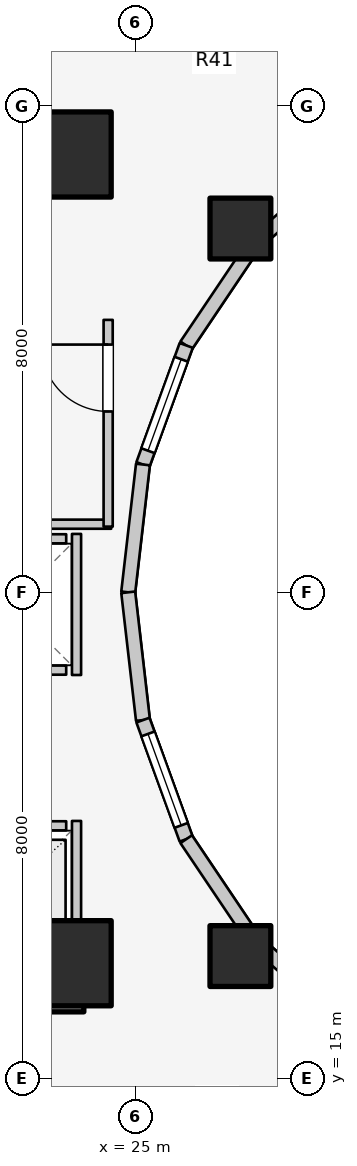
"""IFC4 building model, lengths in metres.
Left out: names, types, materials, properties, quantities, classifications, styles, units other than length and angle.
Written with IfcOpenShell. Run it as: python <this file> out.ifc"""

import sys

from ifc_helpers import new_model, si_unit, direction, frame, frame_2d, origin, origin_2d, place, context, subcontext, project, spatial, rectangle, extrude, element, fill, save


model = new_model("IFC4")
c1 = context("Model", 3, precision=1e-05, world=origin(), true_north=direction((0.0, 1.0)))
c2 = subcontext(c1, "Body", "Model", "MODEL_VIEW")
j1 = project(units=[si_unit("LENGTHUNIT", "METRE"), si_unit("PLANEANGLEUNIT", "RADIAN")], contexts=[c1])
p1 = place(None, origin())
s1 = spatial("IfcSite", under=j1, at=p1, CompositionType="ELEMENT")
p2 = place(p1, origin())
s2 = spatial("IfcBuilding", under=s1, at=p2, CompositionType="ELEMENT")
p3 = place(p2, frame((0.0, 0.0, 30.7)))
s3 = spatial("IfcBuildingStorey", under=s2, at=p3, CompositionType="ELEMENT", Elevation=30.7)
for number, where, z_axis, x_axis in (
    (1, (19.65, 16.55, 0.0), (0.0, 0.0, 1.0), (1.0, 0.0, 0.0)),
    (2, (19.65, 30.35, 0.0), (0.0, 0.0, 1.0), (1.0, 0.0, 0.0)),
):
    element("IfcWall", number, at=place(p3, frame(where, z_axis=z_axis, x_axis=x_axis)), inside=s3, PredefinedType="SHEAR", context=c2, shape_type="SweptSolid", body=[
        extrude(rectangle(XDim=4.5, YDim=0.9, at=frame_2d((2.25, 0.0))), origin(), (0.0, 0.0, 1.0), 3.1),
    ])
for number, where, z_axis, x_axis in (
    (3, (23.9, 16.9, 0.0), (0.0, 0.0, 1.0), (1.0, 0.0, 0.0)),
    (4, (23.9, 30.2, 0.0), (0.0, 0.0, 1.0), (1.0, 0.0, 0.0)),
):
    element("IfcColumn", number, at=place(p3, frame(where, z_axis=z_axis, x_axis=x_axis)), inside=s3, PredefinedType="COLUMN", context=c2, shape_type="SweptSolid", body=[
        extrude(rectangle(XDim=1.4, YDim=1.4, at=origin_2d()), origin(), (0.0, 0.0, 1.0), 3.1),
    ])
for number, where, z_axis, x_axis in (
    (5, (26.725, 28.982, 0.0), (0.0, 0.0, 1.0), (1.0, 0.0, 0.0)),
    (6, (26.725, 17.018, 0.0), (0.0, 0.0, 1.0), (1.0, 0.0, 0.0)),
):
    element("IfcColumn", number, at=place(p3, frame(where, z_axis=z_axis, x_axis=x_axis)), inside=s3, PredefinedType="COLUMN", context=c2, shape_type="SweptSolid", body=[
        extrude(rectangle(XDim=1.0, YDim=1.0, at=origin_2d()), origin(), (0.0, 0.0, 1.0), 3.1),
    ])
p4 = place(p3, frame((28.44, 30.032, 0.0), z_axis=(0.0, 0.0, 1.0), x_axis=(-0.752576694707, -0.658504607869, 0.0)))
e7 = element("IfcWall", 7, at=p4, inside=s3, PredefinedType="STANDARD", context=c2, shape_type="SweptSolid", body=[
    extrude(rectangle(XDim=1.959, YDim=0.23, at=frame_2d((0.98, 0.0))), origin(), (0.0, 0.0, 1.0), 2.16),
])
p5 = place(p3, frame((26.965, 28.742, 0.0), z_axis=(0.0, 0.0, 1.0), x_axis=(-0.558197800898, -0.829707909492, 0.0)))
e8 = element("IfcWall", 8, at=p5, inside=s3, PredefinedType="STANDARD", context=c2, shape_type="SweptSolid", body=[
    extrude(rectangle(XDim=2.027, YDim=0.23, at=frame_2d((1.013, 0.0))), origin(), (0.0, 0.0, 1.0), 2.16),
])
p6 = place(p3, frame((25.834, 27.06, 0.0), z_axis=(0.0, 0.0, 1.0), x_axis=(-0.341423187295, -0.93990968033, 0.0)))
e9 = element("IfcWall", 9, at=p6, inside=s3, PredefinedType="STANDARD", context=c2, shape_type="SweptSolid", body=[
    extrude(rectangle(XDim=2.084, YDim=0.23, at=frame_2d((1.042, 0.0))), origin(), (0.0, 0.0, 1.0), 2.84),
])
p7 = place(p6, frame((0.242, 0.0, 0.85)))
e10 = element("IfcOpeningElement", 10, at=p7, cuts=e9, PredefinedType="OPENING", context=c2, shape_type="SweptSolid", body=[
    extrude(rectangle(XDim=1.6, YDim=1.65, at=frame_2d((0.8, 0.825))), frame((0.0, 0.125, 0.0), z_axis=(0.0, -1.0, 0.0), x_axis=(1.0, 0.0, 0.0)), (0.0, 0.0, 1.0), 0.25),
])
for number, where, z_axis, x_axis in (
    (11, (25.123, 25.102, 0.0), (0.0, 0.0, 1.0), (-0.115, -0.993, 0.0)),
    (12, (24.88, 23.0, 0.0), (0.0, 0.0, 1.0), (0.115, -0.993, 0.0)),
):
    element("IfcWall", number, at=place(p3, frame(where, z_axis=z_axis, x_axis=x_axis)), inside=s3, PredefinedType="STANDARD", context=c2, shape_type="SweptSolid", body=[
        extrude(rectangle(XDim=2.115, YDim=0.23, at=frame_2d((1.058, 0.0))), origin(), (0.0, 0.0, 1.0), 2.84),
    ])
p8 = place(p3, frame((25.123, 20.898, 0.0), z_axis=(0.0, 0.0, 1.0), x_axis=(0.341423187295, -0.93990968033, 0.0)))
e13 = element("IfcWall", 13, at=p8, inside=s3, PredefinedType="STANDARD", context=c2, shape_type="SweptSolid", body=[
    extrude(rectangle(XDim=2.084, YDim=0.23, at=frame_2d((1.042, 0.0))), origin(), (0.0, 0.0, 1.0), 2.84),
])
p9 = place(p8, frame((0.242, 0.0, 0.85)))
e14 = element("IfcOpeningElement", 14, at=p9, cuts=e13, PredefinedType="OPENING", context=c2, shape_type="SweptSolid", body=[
    extrude(rectangle(XDim=1.6, YDim=1.65, at=frame_2d((0.8, 0.825))), frame((0.0, 0.125, 0.0), z_axis=(0.0, -1.0, 0.0), x_axis=(1.0, 0.0, 0.0)), (0.0, 0.0, 1.0), 0.25),
])
p10 = place(p3, frame((25.834, 18.94, 0.0), z_axis=(0.0, 0.0, 1.0), x_axis=(0.558197800898, -0.829707909492, 0.0)))
e15 = element("IfcWall", 15, at=p10, inside=s3, PredefinedType="STANDARD", context=c2, shape_type="SweptSolid", body=[
    extrude(rectangle(XDim=2.027, YDim=0.23, at=frame_2d((1.013, 0.0))), origin(), (0.0, 0.0, 1.0), 2.16),
])
p11 = place(p3, frame((26.965, 17.258, 0.0), z_axis=(0.0, 0.0, 1.0), x_axis=(0.752576694707, -0.658504607869, 0.0)))
e16 = element("IfcWall", 16, at=p11, inside=s3, PredefinedType="STANDARD", context=c2, shape_type="SweptSolid", body=[
    extrude(rectangle(XDim=1.959, YDim=0.23, at=frame_2d((0.98, 0.0))), origin(), (0.0, 0.0, 1.0), 2.16),
])
p12 = place(p3, frame((22.04, 19.16, 0.0), z_axis=(0.0, 0.0, 1.0), x_axis=(1.0, 0.0, 0.0)))
e17 = element("IfcWall", 17, at=p12, inside=s3, PredefinedType="SOLIDWALL", context=c2, shape_type="SweptSolid", body=[
    extrude(rectangle(XDim=1.82, YDim=0.15, at=frame_2d((0.91, 0.0))), origin(), (0.0, 0.0, 1.0), 2.12),
])
p13 = place(p12, frame((0.36, 0.0, 0.0)))
e18 = element("IfcOpeningElement", 18, at=p13, cuts=e17, PredefinedType="OPENING", context=c2, shape_type="SweptSolid", body=[
    extrude(rectangle(XDim=1.1, YDim=2.1, at=frame_2d((0.55, 1.05))), frame((0.0, 0.085, 0.0), z_axis=(0.0, -1.0, 0.0), x_axis=(1.0, 0.0, 0.0)), (0.0, 0.0, 1.0), 0.17),
])
p14 = place(p3, frame((22.04, 17.1, 0.0), z_axis=(0.0, 0.0, 1.0), x_axis=(1.0, 0.0, 0.0)))
e19 = element("IfcWall", 19, at=p14, inside=s3, PredefinedType="SOLIDWALL", context=c2, shape_type="SweptSolid", body=[
    extrude(rectangle(XDim=1.82, YDim=0.15, at=frame_2d((0.91, 0.0))), origin(), (0.0, 0.0, 1.0), 2.12),
])
p15 = place(p3, frame((24.03, 17.02, 0.0), z_axis=(0.0, 0.0, 1.0), x_axis=(0.0, 1.0, 0.0)))
e20 = element("IfcWall", 20, at=p15, inside=s3, PredefinedType="SOLIDWALL", context=c2, shape_type="SweptSolid", body=[
    extrude(rectangle(XDim=2.22, YDim=0.15, at=frame_2d((1.11, 0.0))), origin(), (0.0, 0.0, 1.0), 2.12),
])
for number, where, z_axis, x_axis in (
    (21, (22.04, 21.72, 0.0), (0.0, 0.0, 1.0), (1.0, 0.0, 0.0)),
    (22, (22.04, 23.88, 0.0), (0.0, 0.0, 1.0), (1.0, 0.0, 0.0)),
):
    element("IfcWall", number, at=place(p3, frame(where, z_axis=z_axis, x_axis=x_axis)), inside=s3, PredefinedType="SOLIDWALL", context=c2, shape_type="SweptSolid", body=[
        extrude(rectangle(XDim=1.82, YDim=0.15, at=frame_2d((0.91, 0.0))), origin(), (0.0, 0.0, 1.0), 2.12),
    ])
p16 = place(p3, frame((24.03, 21.64, 0.0), z_axis=(0.0, 0.0, 1.0), x_axis=(0.0, 1.0, 0.0)))
e23 = element("IfcWall", 23, at=p16, inside=s3, PredefinedType="SOLIDWALL", context=c2, shape_type="SweptSolid", body=[
    extrude(rectangle(XDim=2.32, YDim=0.15, at=frame_2d((1.16, 0.0))), origin(), (0.0, 0.0, 1.0), 2.12),
])
p17 = place(p3, frame((19.52, 24.12, 0.0), z_axis=(0.0, 0.0, 1.0), x_axis=(1.0, 0.0, 0.0)))
e24 = element("IfcWall", 24, at=p17, inside=s3, PredefinedType="PARTITIONING", context=c2, shape_type="SweptSolid", body=[
    extrude(rectangle(XDim=5.08, YDim=0.15, at=frame_2d((2.54, 0.0))), origin(), (0.0, 0.0, 1.0), 2.12),
])
p18 = place(p3, frame((24.55, 24.08, 0.0), z_axis=(0.0, 0.0, 1.0), x_axis=(0.0, 1.0, 0.0)))
e25 = element("IfcWall", 25, at=p18, inside=s3, PredefinedType="PARTITIONING", context=c2, shape_type="SweptSolid", body=[
    extrude(rectangle(XDim=3.4, YDim=0.15, at=frame_2d((1.7, 0.0))), origin(), (0.0, 0.0, 1.0), 2.855),
])
p19 = place(p18, frame((1.894, 0.0, 0.0)))
e26 = element("IfcOpeningElement", 26, at=p19, cuts=e25, PredefinedType="OPENING", context=c2, shape_type="SweptSolid", body=[
    extrude(rectangle(XDim=1.1, YDim=2.1, at=frame_2d((0.55, 1.05))), frame((0.0, 0.085, 0.0), z_axis=(0.0, -1.0, 0.0), x_axis=(1.0, 0.0, 0.0)), (0.0, 0.0, 1.0), 0.17),
])
p20 = place(p7, origin())
e27 = element("IfcWindow", 27, at=p20, inside=s3, PartitioningType="SINGLE_PANEL", PredefinedType="WINDOW", context=c2, shape_type="SweptSolid", body=[
    extrude(rectangle(XDim=1.6, YDim=1.65, at=frame_2d((0.8, 0.825))), frame((0.0, 0.03, 0.0), z_axis=(0.0, -1.0, 0.0), x_axis=(1.0, 0.0, 0.0)), (0.0, 0.0, 1.0), 0.06),
])
fill(e10, e27)
p21 = place(p9, origin())
e28 = element("IfcWindow", 28, at=p21, inside=s3, PartitioningType="SINGLE_PANEL", PredefinedType="WINDOW", context=c2, shape_type="SweptSolid", body=[
    extrude(rectangle(XDim=1.6, YDim=1.65, at=frame_2d((0.8, 0.825))), frame((0.0, 0.03, 0.0), z_axis=(0.0, -1.0, 0.0), x_axis=(1.0, 0.0, 0.0)), (0.0, 0.0, 1.0), 0.06),
])
fill(e14, e28)
p22 = place(p19, origin())
e29 = element("IfcDoor", 29, at=p22, inside=s3, OperationType="SINGLE_SWING_RIGHT", PredefinedType="DOOR", context=c2, shape_type="SweptSolid", body=[
    extrude(rectangle(XDim=1.1, YDim=2.1, at=frame_2d((0.55, 1.05))), frame((0.0, 0.025, 0.0), z_axis=(0.0, -1.0, 0.0), x_axis=(1.0, 0.0, 0.0)), (0.0, 0.0, 1.0), 0.05),
])
fill(e26, e29)
save(model, sys.argv[1])
